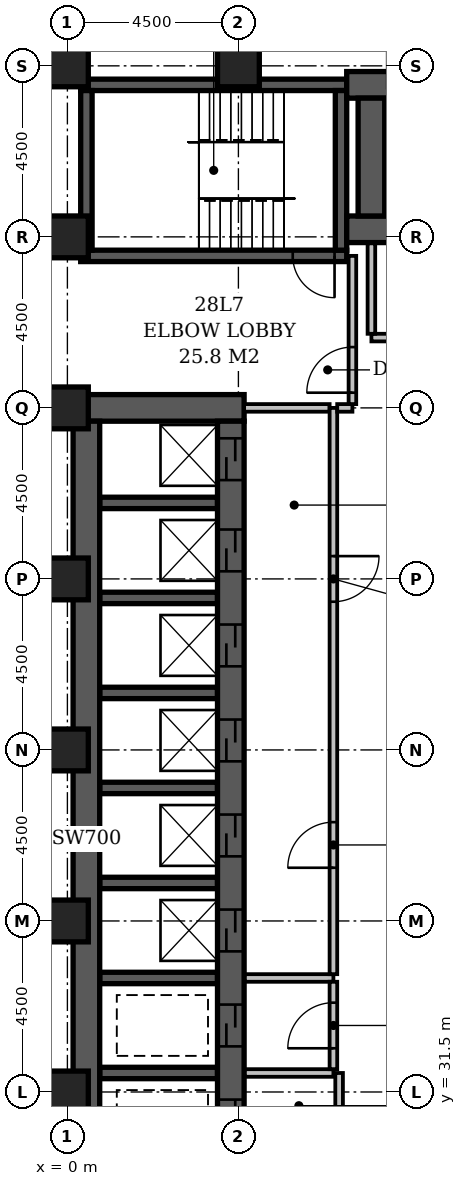
"""IFC4 building model, lengths in metres.
Left out: names, types, materials, properties, quantities, classifications, styles, units other than length and angle.
Written with IfcOpenShell. Run it as: python <this file> out.ifc"""

import sys

from ifc_helpers import new_model, si_unit, direction, frame, frame_2d, origin, origin_2d, place, context, subcontext, project, spatial, rectangle, extrude, element, fill, save


model = new_model("IFC4")
c1 = context("Model", 3, precision=1e-05, world=origin(), true_north=direction((0.0, 1.0)))
c2 = subcontext(c1, "Body", "Model", "MODEL_VIEW")
j1 = project(units=[si_unit("LENGTHUNIT", "METRE"), si_unit("PLANEANGLEUNIT", "RADIAN")], contexts=[c1])
p1 = place(None, origin())
s1 = spatial("IfcSite", under=j1, at=p1, CompositionType="ELEMENT")
p2 = place(p1, origin())
s2 = spatial("IfcBuilding", under=s1, at=p2, CompositionType="ELEMENT")
p3 = place(p2, frame((0.0, 0.0, 113.6)))
s3 = spatial("IfcBuildingStorey", under=s2, at=p3, CompositionType="ELEMENT", Elevation=113.6)
p4 = place(p3, frame((0.15, 49.5, -0.5), z_axis=(0.0, 0.0, 1.0), x_axis=(1.0, 0.0, 0.0)))
e1 = element("IfcWall", 1, at=p4, inside=s3, PredefinedType="SHEAR", context=c2, shape_type="SweptSolid", body=[
    extrude(rectangle(XDim=4.5, YDim=0.7, at=frame_2d((2.25, 0.0))), origin(), (0.0, 0.0, 1.0), 6.2),
])
p5 = place(p3, frame((0.35, 53.5, -0.5), z_axis=(0.0, 0.0, 1.0), x_axis=(1.0, 0.0, 0.0)))
e2 = element("IfcWall", 2, at=p5, inside=s3, PredefinedType="SHEAR", context=c2, shape_type="SweptSolid", body=[
    extrude(rectangle(XDim=7.0, YDim=0.3, at=frame_2d((3.5, 0.0))), origin(), (0.0, 0.0, 1.0), 6.2),
])
p6 = place(p5, frame((5.58, 0.0, 0.5)))
e3 = element("IfcOpeningElement", 3, at=p6, cuts=e2, PredefinedType="OPENING", context=c2, shape_type="SweptSolid", body=[
    extrude(rectangle(XDim=1.1, YDim=2.1, at=frame_2d((0.55, 1.05))), frame((0.0, 0.162, 0.0), z_axis=(0.0, -1.0, 0.0), x_axis=(1.0, 0.0, 0.0)), (0.0, 0.0, 1.0), 0.324),
])
p7 = place(p3, frame((0.35, 58.0, -0.5), z_axis=(0.0, 0.0, 1.0), x_axis=(1.0, 0.0, 0.0)))
e4 = element("IfcWall", 4, at=p7, inside=s3, PredefinedType="SHEAR", context=c2, shape_type="SweptSolid", body=[
    extrude(rectangle(XDim=7.0, YDim=0.3, at=frame_2d((3.5, 0.0))), origin(), (0.0, 0.0, 1.0), 6.2),
])
p8 = place(p3, frame((0.5, 27.15, -0.5), z_axis=(0.0, 0.0, 1.0), x_axis=(0.0, 1.0, 0.0)))
e5 = element("IfcWall", 5, at=p8, inside=s3, PredefinedType="SHEAR", context=c2, shape_type="SweptSolid", body=[
    extrude(rectangle(XDim=22.0, YDim=0.7, at=frame_2d((11.0, 0.0))), origin(), (0.0, 0.0, 1.0), 6.2),
])
p9 = place(p3, frame((0.5, 53.65, -0.5), z_axis=(0.0, 0.0, 1.0), x_axis=(0.0, 1.0, 0.0)))
e6 = element("IfcWall", 6, at=p9, inside=s3, PredefinedType="SHEAR", context=c2, shape_type="SweptSolid", body=[
    extrude(rectangle(XDim=4.2, YDim=0.3, at=frame_2d((2.1, 0.0))), origin(), (0.0, 0.0, 1.0), 6.2),
])
for number, where, z_axis, x_axis in (
    (7, (0.85, 32.0, -0.5), (0.0, 0.0, 1.0), (1.0, 0.0, 0.0)),
    (8, (0.85, 34.5, -0.5), (0.0, 0.0, 1.0), (1.0, 0.0, 0.0)),
    (9, (0.85, 37.0, -0.5), (0.0, 0.0, 1.0), (1.0, 0.0, 0.0)),
    (10, (0.85, 39.5, -0.5), (0.0, 0.0, 1.0), (1.0, 0.0, 0.0)),
    (11, (0.85, 42.0, -0.5), (0.0, 0.0, 1.0), (1.0, 0.0, 0.0)),
    (12, (0.85, 44.5, -0.5), (0.0, 0.0, 1.0), (1.0, 0.0, 0.0)),
    (13, (0.85, 47.0, -0.5), (0.0, 0.0, 1.0), (1.0, 0.0, 0.0)),
):
    element("IfcWall", number, at=place(p3, frame(where, z_axis=z_axis, x_axis=x_axis)), inside=s3, PredefinedType="SHEAR", context=c2, shape_type="SweptSolid", body=[
        extrude(rectangle(XDim=3.1, YDim=0.3, at=frame_2d((1.55, 0.0))), origin(), (0.0, 0.0, 1.0), 6.2),
    ])
p10 = place(p3, frame((4.3, 27.15, -0.5), z_axis=(0.0, 0.0, 1.0), x_axis=(0.0, 1.0, 0.0)))
e14 = element("IfcWall", 14, at=p10, inside=s3, PredefinedType="SHEAR", context=c2, shape_type="SweptSolid", body=[
    extrude(rectangle(XDim=22.0, YDim=0.7, at=frame_2d((11.0, 0.0))), origin(), (0.0, 0.0, 1.0), 6.2),
])
p11 = place(p10, frame((3.05, 0.0, 0.5)))
e15 = element("IfcOpeningElement", 15, at=p11, cuts=e14, PredefinedType="OPENING", context=c2, shape_type="SweptSolid", body=[
    extrude(rectangle(XDim=1.1, YDim=2.1, at=frame_2d((0.55, 1.05))), frame((0.0, 0.362, 0.0), z_axis=(0.0, -1.0, 0.0), x_axis=(1.0, 0.0, 0.0)), (0.0, 0.0, 1.0), 0.724),
])
p12 = place(p10, frame((0.55, 0.0, 0.5)))
e16 = element("IfcOpeningElement", 16, at=p12, cuts=e14, PredefinedType="OPENING", context=c2, shape_type="SweptSolid", body=[
    extrude(rectangle(XDim=1.1, YDim=2.1, at=frame_2d((0.55, 1.05))), frame((0.0, 0.362, 0.0), z_axis=(0.0, -1.0, 0.0), x_axis=(1.0, 0.0, 0.0)), (0.0, 0.0, 1.0), 0.724),
])
p13 = place(p10, frame((20.45, 0.0, 0.5)))
e17 = element("IfcOpeningElement", 17, at=p13, cuts=e14, PredefinedType="OPENING", context=c2, shape_type="SweptSolid", body=[
    extrude(rectangle(XDim=1.1, YDim=2.1, at=frame_2d((0.55, 1.05))), frame((0.0, 0.362, 0.0), z_axis=(0.0, -1.0, 0.0), x_axis=(1.0, 0.0, 0.0)), (0.0, 0.0, 1.0), 0.724),
])
p14 = place(p10, frame((18.05, 0.0, 0.5)))
e18 = element("IfcOpeningElement", 18, at=p14, cuts=e14, PredefinedType="OPENING", context=c2, shape_type="SweptSolid", body=[
    extrude(rectangle(XDim=1.1, YDim=2.1, at=frame_2d((0.55, 1.05))), frame((0.0, 0.362, 0.0), z_axis=(0.0, -1.0, 0.0), x_axis=(1.0, 0.0, 0.0)), (0.0, 0.0, 1.0), 0.724),
])
p15 = place(p10, frame((15.55, 0.0, 0.5)))
e19 = element("IfcOpeningElement", 19, at=p15, cuts=e14, PredefinedType="OPENING", context=c2, shape_type="SweptSolid", body=[
    extrude(rectangle(XDim=1.1, YDim=2.1, at=frame_2d((0.55, 1.05))), frame((0.0, 0.362, 0.0), z_axis=(0.0, -1.0, 0.0), x_axis=(1.0, 0.0, 0.0)), (0.0, 0.0, 1.0), 0.724),
])
p16 = place(p10, frame((13.05, 0.0, 0.5)))
e20 = element("IfcOpeningElement", 20, at=p16, cuts=e14, PredefinedType="OPENING", context=c2, shape_type="SweptSolid", body=[
    extrude(rectangle(XDim=1.1, YDim=2.1, at=frame_2d((0.55, 1.05))), frame((0.0, 0.362, 0.0), z_axis=(0.0, -1.0, 0.0), x_axis=(1.0, 0.0, 0.0)), (0.0, 0.0, 1.0), 0.724),
])
p17 = place(p10, frame((10.55, 0.0, 0.5)))
e21 = element("IfcOpeningElement", 21, at=p17, cuts=e14, PredefinedType="OPENING", context=c2, shape_type="SweptSolid", body=[
    extrude(rectangle(XDim=1.1, YDim=2.1, at=frame_2d((0.55, 1.05))), frame((0.0, 0.362, 0.0), z_axis=(0.0, -1.0, 0.0), x_axis=(1.0, 0.0, 0.0)), (0.0, 0.0, 1.0), 0.724),
])
p18 = place(p10, frame((8.05, 0.0, 0.5)))
e22 = element("IfcOpeningElement", 22, at=p18, cuts=e14, PredefinedType="OPENING", context=c2, shape_type="SweptSolid", body=[
    extrude(rectangle(XDim=1.1, YDim=2.1, at=frame_2d((0.55, 1.05))), frame((0.0, 0.362, 0.0), z_axis=(0.0, -1.0, 0.0), x_axis=(1.0, 0.0, 0.0)), (0.0, 0.0, 1.0), 0.724),
])
p19 = place(p10, frame((5.55, 0.0, 0.5)))
e23 = element("IfcOpeningElement", 23, at=p19, cuts=e14, PredefinedType="OPENING", context=c2, shape_type="SweptSolid", body=[
    extrude(rectangle(XDim=1.1, YDim=2.1, at=frame_2d((0.55, 1.05))), frame((0.0, 0.362, 0.0), z_axis=(0.0, -1.0, 0.0), x_axis=(1.0, 0.0, 0.0)), (0.0, 0.0, 1.0), 0.724),
])
p20 = place(p3, frame((7.2, 53.65, -0.5), z_axis=(0.0, 0.0, 1.0), x_axis=(0.0, 1.0, 0.0)))
e24 = element("IfcWall", 24, at=p20, inside=s3, PredefinedType="SHEAR", context=c2, shape_type="SweptSolid", body=[
    extrude(rectangle(XDim=4.2, YDim=0.3, at=frame_2d((2.1, 0.0))), origin(), (0.0, 0.0, 1.0), 6.2),
])
p21 = place(p3, frame((7.35, 54.2, -0.5), z_axis=(0.0, 0.0, 1.0), x_axis=(1.0, 0.0, 0.0)))
e25 = element("IfcWall", 25, at=p21, inside=s3, PredefinedType="SHEAR", context=c2, shape_type="SweptSolid", body=[
    extrude(rectangle(XDim=16.5, YDim=0.7, at=frame_2d((8.25, 0.0))), origin(), (0.0, 0.0, 1.0), 6.2),
])
p22 = place(p21, frame((1.35, 0.0, 0.5)))
e26 = element("IfcOpeningElement", 26, at=p22, cuts=e25, PredefinedType="OPENING", context=c2, shape_type="SweptSolid", body=[
    extrude(rectangle(XDim=1.1, YDim=2.1, at=frame_2d((0.55, 1.05))), frame((0.0, 0.362, 0.0), z_axis=(0.0, -1.0, 0.0), x_axis=(1.0, 0.0, 0.0)), (0.0, 0.0, 1.0), 0.724),
])
p23 = place(p21, frame((3.85, 0.0, 0.5)))
e27 = element("IfcOpeningElement", 27, at=p23, cuts=e25, PredefinedType="OPENING", context=c2, shape_type="SweptSolid", body=[
    extrude(rectangle(XDim=1.1, YDim=2.1, at=frame_2d((0.55, 1.05))), frame((0.0, 0.362, 0.0), z_axis=(0.0, -1.0, 0.0), x_axis=(1.0, 0.0, 0.0)), (0.0, 0.0, 1.0), 0.724),
])
p24 = place(p21, frame((6.35, 0.0, 0.5)))
e28 = element("IfcOpeningElement", 28, at=p24, cuts=e25, PredefinedType="OPENING", context=c2, shape_type="SweptSolid", body=[
    extrude(rectangle(XDim=1.1, YDim=2.1, at=frame_2d((0.55, 1.05))), frame((0.0, 0.362, 0.0), z_axis=(0.0, -1.0, 0.0), x_axis=(1.0, 0.0, 0.0)), (0.0, 0.0, 1.0), 0.724),
])
p25 = place(p21, frame((8.85, 0.0, 0.5)))
e29 = element("IfcOpeningElement", 29, at=p25, cuts=e25, PredefinedType="OPENING", context=c2, shape_type="SweptSolid", body=[
    extrude(rectangle(XDim=1.1, YDim=2.1, at=frame_2d((0.55, 1.05))), frame((0.0, 0.362, 0.0), z_axis=(0.0, -1.0, 0.0), x_axis=(1.0, 0.0, 0.0)), (0.0, 0.0, 1.0), 0.724),
])
p26 = place(p21, frame((11.35, 0.0, 0.5)))
e30 = element("IfcOpeningElement", 30, at=p26, cuts=e25, PredefinedType="OPENING", context=c2, shape_type="SweptSolid", body=[
    extrude(rectangle(XDim=1.1, YDim=2.1, at=frame_2d((0.55, 1.05))), frame((0.0, 0.362, 0.0), z_axis=(0.0, -1.0, 0.0), x_axis=(1.0, 0.0, 0.0)), (0.0, 0.0, 1.0), 0.724),
])
p27 = place(p21, frame((13.85, 0.0, 0.5)))
e31 = element("IfcOpeningElement", 31, at=p27, cuts=e25, PredefinedType="OPENING", context=c2, shape_type="SweptSolid", body=[
    extrude(rectangle(XDim=1.1, YDim=2.1, at=frame_2d((0.55, 1.05))), frame((0.0, 0.362, 0.0), z_axis=(0.0, -1.0, 0.0), x_axis=(1.0, 0.0, 0.0)), (0.0, 0.0, 1.0), 0.724),
])
p28 = place(p3, frame((7.35, 58.0, -0.5), z_axis=(0.0, 0.0, 1.0), x_axis=(1.0, 0.0, 0.0)))
e32 = element("IfcWall", 32, at=p28, inside=s3, PredefinedType="SHEAR", context=c2, shape_type="SweptSolid", body=[
    extrude(rectangle(XDim=16.5, YDim=0.7, at=frame_2d((8.25, 0.0))), origin(), (0.0, 0.0, 1.0), 6.2),
])
p29 = place(p3, frame((8.0, 54.55, -0.5), z_axis=(0.0, 0.0, 1.0), x_axis=(0.0, 1.0, 0.0)))
e33 = element("IfcWall", 33, at=p29, inside=s3, PredefinedType="SHEAR", context=c2, shape_type="SweptSolid", body=[
    extrude(rectangle(XDim=3.1, YDim=0.7, at=frame_2d((1.55, 0.0))), origin(), (0.0, 0.0, 1.0), 6.2),
])
for number, where, z_axis, x_axis in (
    (34, (0.0, 31.5, -0.5), (0.0, 0.0, 1.0), (1.0, 0.0, 0.0)),
    (35, (0.0, 36.0, -0.5), (0.0, 0.0, 1.0), (1.0, 0.0, 0.0)),
    (36, (0.0, 40.5, -0.5), (0.0, 0.0, 1.0), (1.0, 0.0, 0.0)),
    (37, (0.0, 45.0, -0.5), (0.0, 0.0, 1.0), (1.0, 0.0, 0.0)),
    (38, (0.0, 49.5, -0.5), (0.0, 0.0, 1.0), (1.0, 0.0, 0.0)),
    (39, (0.0, 54.0, -0.5), (0.0, 0.0, 1.0), (1.0, 0.0, 0.0)),
    (40, (0.0, 58.5, -0.5), (0.0, 0.0, 1.0), (1.0, 0.0, 0.0)),
    (41, (4.5, 58.5, -0.5), (0.0, 0.0, 1.0), (1.0, 0.0, 0.0)),
):
    element("IfcColumn", number, at=place(p3, frame(where, z_axis=z_axis, x_axis=x_axis)), inside=s3, PredefinedType="COLUMN", context=c2, shape_type="SweptSolid", body=[
        extrude(rectangle(XDim=1.1, YDim=1.1, at=origin_2d()), origin(), (0.0, 0.0, 1.0), 6.2),
    ])
p30 = place(p3, frame((8.0, 51.35, 0.0), z_axis=(0.0, 0.0, 1.0), x_axis=(1.0, 0.0, 0.0)))
e42 = element("IfcWall", 42, at=p30, inside=s3, PredefinedType="PARTITIONING", context=c2, shape_type="SweptSolid", body=[
    extrude(rectangle(XDim=15.0, YDim=0.2, at=frame_2d((7.5, 0.0))), origin(), (0.0, 0.0, 1.0), 5.7),
])
p31 = place(p30, frame((3.4, 0.0, 0.0)))
e43 = element("IfcOpeningElement", 43, at=p31, cuts=e42, PredefinedType="OPENING", context=c2, shape_type="SweptSolid", body=[
    extrude(rectangle(XDim=1.2, YDim=2.1, at=frame_2d((0.6, 1.05))), frame((0.0, 0.112, 0.0), z_axis=(0.0, -1.0, 0.0), x_axis=(1.0, 0.0, 0.0)), (0.0, 0.0, 1.0), 0.224),
])
p32 = place(p30, frame((9.4, 0.0, 0.0)))
e44 = element("IfcOpeningElement", 44, at=p32, cuts=e42, PredefinedType="OPENING", context=c2, shape_type="SweptSolid", body=[
    extrude(rectangle(XDim=1.2, YDim=2.1, at=frame_2d((0.6, 1.05))), frame((0.0, 0.112, 0.0), z_axis=(0.0, -1.0, 0.0), x_axis=(1.0, 0.0, 0.0)), (0.0, 0.0, 1.0), 0.224),
])
p33 = place(p3, frame((8.0, 51.45, 0.0), z_axis=(0.0, 0.0, 1.0), x_axis=(0.0, 1.0, 0.0)))
e45 = element("IfcWall", 45, at=p33, inside=s3, PredefinedType="PARTITIONING", context=c2, shape_type="SweptSolid", body=[
    extrude(rectangle(XDim=2.38, YDim=0.2, at=frame_2d((1.19, 0.0))), origin(), (0.0, 0.0, 1.0), 5.7),
])
p34 = place(p3, frame((4.67, 34.5, 0.0), z_axis=(0.0, 0.0, 1.0), x_axis=(1.0, 0.0, 0.0)))
e46 = element("IfcWall", 46, at=p34, inside=s3, PredefinedType="PARTITIONING", context=c2, shape_type="SweptSolid", body=[
    extrude(rectangle(XDim=2.33, YDim=0.2, at=frame_2d((1.165, 0.0))), origin(), (0.0, 0.0, 1.0), 5.7),
])
p35 = place(p3, frame((7.0, 34.6, 0.0), z_axis=(0.0, 0.0, 1.0), x_axis=(0.0, 1.0, 0.0)))
e47 = element("IfcWall", 47, at=p35, inside=s3, PredefinedType="PARTITIONING", context=c2, shape_type="SweptSolid", body=[
    extrude(rectangle(XDim=14.9, YDim=0.2, at=frame_2d((7.45, 0.0))), origin(), (0.0, 0.0, 1.0), 5.7),
])
p36 = place(p35, frame((2.8, 0.0, 0.0)))
e48 = element("IfcOpeningElement", 48, at=p36, cuts=e47, PredefinedType="OPENING", context=c2, shape_type="SweptSolid", body=[
    extrude(rectangle(XDim=1.2, YDim=2.1, at=frame_2d((0.6, 1.05))), frame((0.0, 0.112, 0.0), z_axis=(0.0, -1.0, 0.0), x_axis=(1.0, 0.0, 0.0)), (0.0, 0.0, 1.0), 0.224),
])
p37 = place(p35, frame((9.8, 0.0, 0.0)))
e49 = element("IfcOpeningElement", 49, at=p37, cuts=e47, PredefinedType="OPENING", context=c2, shape_type="SweptSolid", body=[
    extrude(rectangle(XDim=1.2, YDim=2.1, at=frame_2d((0.6, 1.05))), frame((0.0, 0.112, 0.0), z_axis=(0.0, -1.0, 0.0), x_axis=(1.0, 0.0, 0.0)), (0.0, 0.0, 1.0), 0.224),
])
p38 = place(p3, frame((4.65, 49.5, 0.0), z_axis=(0.0, 0.0, 1.0), x_axis=(1.0, 0.0, 0.0)))
e50 = element("IfcWall", 50, at=p38, inside=s3, PredefinedType="PARTITIONING", context=c2, shape_type="SweptSolid", body=[
    extrude(rectangle(XDim=2.25, YDim=0.2, at=frame_2d((1.125, 0.0))), origin(), (0.0, 0.0, 1.0), 5.7),
])
p39 = place(p3, frame((4.67, 32.0, 0.0), z_axis=(0.0, 0.0, 1.0), x_axis=(1.0, 0.0, 0.0)))
e51 = element("IfcWall", 51, at=p39, inside=s3, PredefinedType="PARTITIONING", context=c2, shape_type="SweptSolid", body=[
    extrude(rectangle(XDim=2.33, YDim=0.2, at=frame_2d((1.165, 0.0))), origin(), (0.0, 0.0, 1.0), 5.7),
])
p40 = place(p3, frame((7.0, 32.1, 0.0), z_axis=(0.0, 0.0, 1.0), x_axis=(0.0, 1.0, 0.0)))
e52 = element("IfcWall", 52, at=p40, inside=s3, PredefinedType="PARTITIONING", context=c2, shape_type="SweptSolid", body=[
    extrude(rectangle(XDim=2.3, YDim=0.2, at=frame_2d((1.15, 0.0))), origin(), (0.0, 0.0, 1.0), 5.7),
])
p41 = place(p40, frame((0.55, 0.0, 0.0)))
e53 = element("IfcOpeningElement", 53, at=p41, cuts=e52, PredefinedType="OPENING", context=c2, shape_type="SweptSolid", body=[
    extrude(rectangle(XDim=1.2, YDim=2.1, at=frame_2d((0.6, 1.05))), frame((0.0, 0.112, 0.0), z_axis=(0.0, -1.0, 0.0), x_axis=(1.0, 0.0, 0.0)), (0.0, 0.0, 1.0), 0.224),
])
p42 = place(p3, frame((7.15, 27.17, 0.0), z_axis=(0.0, 0.0, 1.0), x_axis=(0.0, 1.0, 0.0)))
e54 = element("IfcWall", 54, at=p42, inside=s3, PredefinedType="PARTITIONING", context=c2, shape_type="SweptSolid", body=[
    extrude(rectangle(XDim=4.83, YDim=0.2, at=frame_2d((2.415, 0.0))), origin(), (0.0, 0.0, 1.0), 5.7),
])
p43 = place(p42, frame((1.73, 0.0, 0.0)))
e55 = element("IfcOpeningElement", 55, at=p43, cuts=e54, PredefinedType="OPENING", context=c2, shape_type="SweptSolid", body=[
    extrude(rectangle(XDim=1.2, YDim=2.1, at=frame_2d((0.6, 1.05))), frame((0.0, 0.112, 0.0), z_axis=(0.0, -1.0, 0.0), x_axis=(1.0, 0.0, 0.0)), (0.0, 0.0, 1.0), 0.224),
])
p44 = place(p3, frame((7.1, 49.5, 0.0), z_axis=(0.0, 0.0, 1.0), x_axis=(1.0, 0.0, 0.0)))
e56 = element("IfcWall", 56, at=p44, inside=s3, PredefinedType="PARTITIONING", context=c2, shape_type="SweptSolid", body=[
    extrude(rectangle(XDim=0.4, YDim=0.2, at=frame_2d((0.2, 0.0))), origin(), (0.0, 0.0, 1.0), 5.7),
])
p45 = place(p3, frame((7.5, 49.6, 0.0), z_axis=(0.0, 0.0, 1.0), x_axis=(0.0, 1.0, 0.0)))
e57 = element("IfcWall", 57, at=p45, inside=s3, PredefinedType="PARTITIONING", context=c2, shape_type="SweptSolid", body=[
    extrude(rectangle(XDim=3.9, YDim=0.2, at=frame_2d((1.95, 0.0))), origin(), (0.0, 0.0, 1.0), 5.7),
])
p46 = place(p45, frame((0.3, 0.0, 0.0)))
e58 = element("IfcOpeningElement", 58, at=p46, cuts=e57, PredefinedType="OPENING", context=c2, shape_type="SweptSolid", body=[
    extrude(rectangle(XDim=1.2, YDim=2.1, at=frame_2d((0.6, 1.05))), frame((0.0, 0.112, 0.0), z_axis=(0.0, -1.0, 0.0), x_axis=(1.0, 0.0, 0.0)), (0.0, 0.0, 1.0), 0.224),
])
p47 = place(p46, origin())
e59 = element("IfcDoor", 59, at=p47, inside=s3, OperationType="SINGLE_SWING_LEFT", PredefinedType="DOOR", context=c2, shape_type="SweptSolid", body=[
    extrude(rectangle(XDim=1.2, YDim=2.1, at=frame_2d((0.6, 1.05))), frame((0.0, 0.025, 0.0), z_axis=(0.0, -1.0, 0.0), x_axis=(1.0, 0.0, 0.0)), (0.0, 0.0, 1.0), 0.05),
])
fill(e58, e59)
p48 = place(p11, origin())
e60 = element("IfcDoor", 60, at=p48, inside=s3, OperationType="SLIDING_TO_LEFT", PredefinedType="DOOR", context=c2, shape_type="SweptSolid", body=[
    extrude(rectangle(XDim=1.1, YDim=2.1, at=frame_2d((0.55, 1.05))), frame((0.0, 0.025, 0.0), z_axis=(0.0, -1.0, 0.0), x_axis=(1.0, 0.0, 0.0)), (0.0, 0.0, 1.0), 0.05),
])
fill(e15, e60)
p49 = place(p13, origin())
e61 = element("IfcDoor", 61, at=p49, inside=s3, OperationType="SLIDING_TO_LEFT", PredefinedType="DOOR", context=c2, shape_type="SweptSolid", body=[
    extrude(rectangle(XDim=1.1, YDim=2.1, at=frame_2d((0.55, 1.05))), frame((0.0, 0.025, 0.0), z_axis=(0.0, -1.0, 0.0), x_axis=(1.0, 0.0, 0.0)), (0.0, 0.0, 1.0), 0.05),
])
fill(e17, e61)
p50 = place(p14, origin())
e62 = element("IfcDoor", 62, at=p50, inside=s3, OperationType="SLIDING_TO_LEFT", PredefinedType="DOOR", context=c2, shape_type="SweptSolid", body=[
    extrude(rectangle(XDim=1.1, YDim=2.1, at=frame_2d((0.55, 1.05))), frame((0.0, 0.025, 0.0), z_axis=(0.0, -1.0, 0.0), x_axis=(1.0, 0.0, 0.0)), (0.0, 0.0, 1.0), 0.05),
])
fill(e18, e62)
p51 = place(p15, origin())
e63 = element("IfcDoor", 63, at=p51, inside=s3, OperationType="SLIDING_TO_LEFT", PredefinedType="DOOR", context=c2, shape_type="SweptSolid", body=[
    extrude(rectangle(XDim=1.1, YDim=2.1, at=frame_2d((0.55, 1.05))), frame((0.0, 0.025, 0.0), z_axis=(0.0, -1.0, 0.0), x_axis=(1.0, 0.0, 0.0)), (0.0, 0.0, 1.0), 0.05),
])
fill(e19, e63)
p52 = place(p16, origin())
e64 = element("IfcDoor", 64, at=p52, inside=s3, OperationType="SLIDING_TO_LEFT", PredefinedType="DOOR", context=c2, shape_type="SweptSolid", body=[
    extrude(rectangle(XDim=1.1, YDim=2.1, at=frame_2d((0.55, 1.05))), frame((0.0, 0.025, 0.0), z_axis=(0.0, -1.0, 0.0), x_axis=(1.0, 0.0, 0.0)), (0.0, 0.0, 1.0), 0.05),
])
fill(e20, e64)
p53 = place(p17, origin())
e65 = element("IfcDoor", 65, at=p53, inside=s3, OperationType="SLIDING_TO_LEFT", PredefinedType="DOOR", context=c2, shape_type="SweptSolid", body=[
    extrude(rectangle(XDim=1.1, YDim=2.1, at=frame_2d((0.55, 1.05))), frame((0.0, 0.025, 0.0), z_axis=(0.0, -1.0, 0.0), x_axis=(1.0, 0.0, 0.0)), (0.0, 0.0, 1.0), 0.05),
])
fill(e21, e65)
p54 = place(p18, origin())
e66 = element("IfcDoor", 66, at=p54, inside=s3, OperationType="SLIDING_TO_LEFT", PredefinedType="DOOR", context=c2, shape_type="SweptSolid", body=[
    extrude(rectangle(XDim=1.1, YDim=2.1, at=frame_2d((0.55, 1.05))), frame((0.0, 0.025, 0.0), z_axis=(0.0, -1.0, 0.0), x_axis=(1.0, 0.0, 0.0)), (0.0, 0.0, 1.0), 0.05),
])
fill(e22, e66)
p55 = place(p36, origin())
e67 = element("IfcDoor", 67, at=p55, inside=s3, OperationType="SINGLE_SWING_LEFT", PredefinedType="DOOR", context=c2, shape_type="SweptSolid", body=[
    extrude(rectangle(XDim=1.2, YDim=2.1, at=frame_2d((0.6, 1.05))), frame((0.0, 0.025, 0.0), z_axis=(0.0, -1.0, 0.0), x_axis=(1.0, 0.0, 0.0)), (0.0, 0.0, 1.0), 0.05),
])
fill(e48, e67)
p56 = place(p37, origin())
e68 = element("IfcDoor", 68, at=p56, inside=s3, OperationType="SINGLE_SWING_RIGHT", PredefinedType="DOOR", context=c2, shape_type="SweptSolid", body=[
    extrude(rectangle(XDim=1.2, YDim=2.1, at=frame_2d((0.6, 1.05))), frame((0.0, 0.025, 0.0), z_axis=(0.0, -1.0, 0.0), x_axis=(1.0, 0.0, 0.0)), (0.0, 0.0, 1.0), 0.05),
])
fill(e49, e68)
p57 = place(p41, origin())
e69 = element("IfcDoor", 69, at=p57, inside=s3, OperationType="SINGLE_SWING_LEFT", PredefinedType="DOOR", context=c2, shape_type="SweptSolid", body=[
    extrude(rectangle(XDim=1.2, YDim=2.1, at=frame_2d((0.6, 1.05))), frame((0.0, 0.025, 0.0), z_axis=(0.0, -1.0, 0.0), x_axis=(1.0, 0.0, 0.0)), (0.0, 0.0, 1.0), 0.05),
])
fill(e53, e69)
p58 = place(p19, origin())
e70 = element("IfcDoor", 70, at=p58, inside=s3, OperationType="SLIDING_TO_LEFT", PredefinedType="DOOR", context=c2, shape_type="SweptSolid", body=[
    extrude(rectangle(XDim=1.1, YDim=2.1, at=frame_2d((0.55, 1.05))), frame((0.0, 0.025, 0.0), z_axis=(0.0, -1.0, 0.0), x_axis=(1.0, 0.0, 0.0)), (0.0, 0.0, 1.0), 0.05),
])
fill(e23, e70)
p59 = place(p6, origin())
e71 = element("IfcDoor", 71, at=p59, inside=s3, OperationType="SINGLE_SWING_RIGHT", PredefinedType="DOOR", context=c2, shape_type="SweptSolid", body=[
    extrude(rectangle(XDim=1.1, YDim=2.1, at=frame_2d((0.55, 1.05))), frame((0.0, 0.025, 0.0), z_axis=(0.0, -1.0, 0.0), x_axis=(1.0, 0.0, 0.0)), (0.0, 0.0, 1.0), 0.05),
])
fill(e3, e71)
save(model, sys.argv[1])
